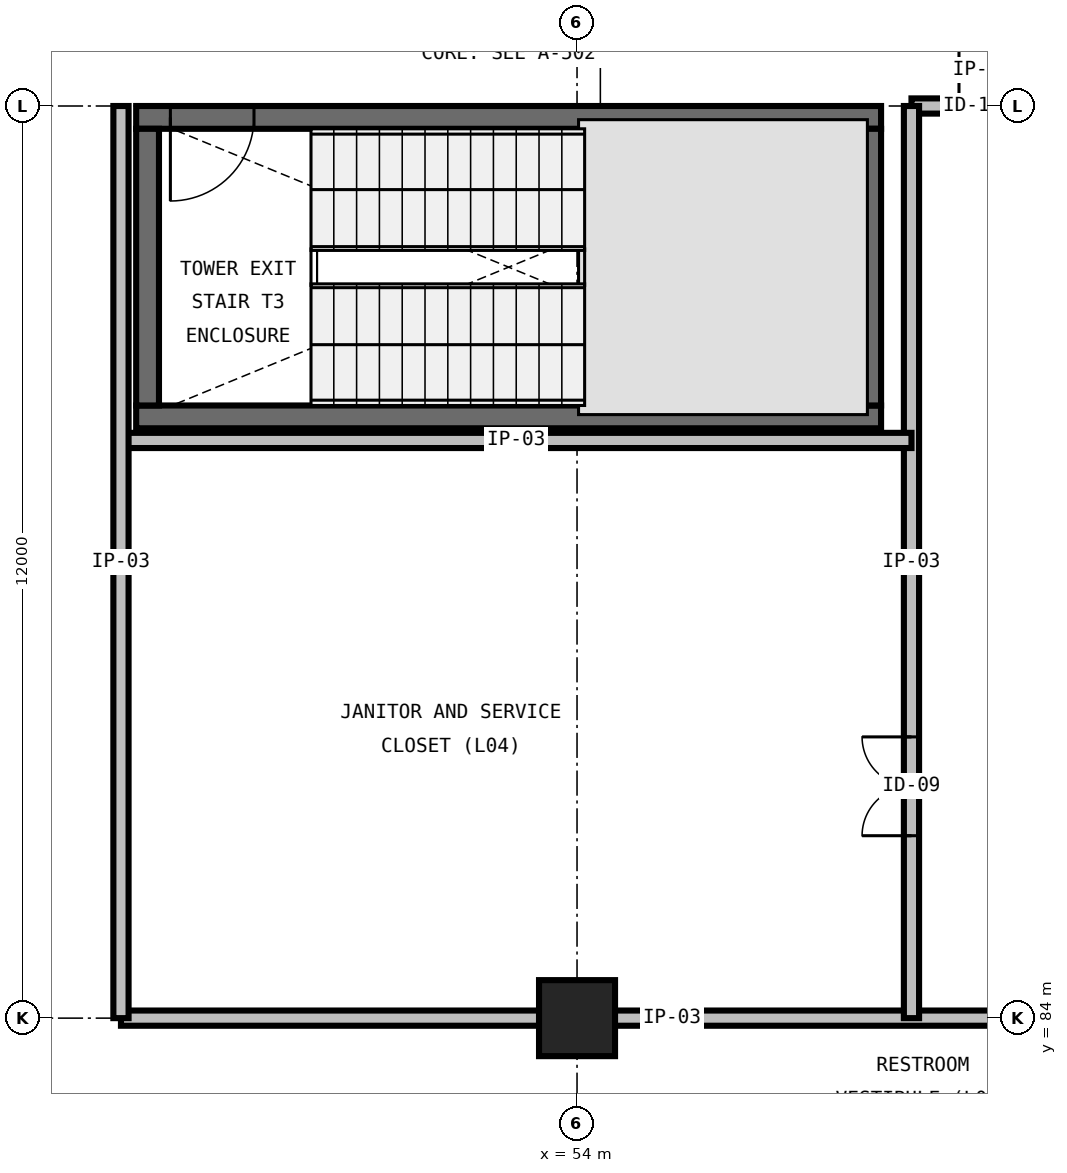
"""IFC4 building model, lengths in metres.
Left out: names, types, materials, properties, quantities, classifications, styles, units other than length and angle.
Written with IfcOpenShell. Run it as: python <this file> out.ifc"""

import sys

from ifc_helpers import new_model, si_unit, direction, frame, frame_2d, origin, origin_2d, place, context, subcontext, project, spatial, rectangle, extrude, element, fill, save


model = new_model("IFC4")
c1 = context("Model", 3, precision=1e-05, world=origin(), true_north=direction((0.0, 1.0)))
c2 = subcontext(c1, "Body", "Model", "MODEL_VIEW")
j1 = project(units=[si_unit("LENGTHUNIT", "METRE"), si_unit("PLANEANGLEUNIT", "RADIAN")], contexts=[c1])
p1 = place(None, origin())
s1 = spatial("IfcSite", under=j1, at=p1, CompositionType="ELEMENT")
p2 = place(p1, origin())
s2 = spatial("IfcBuilding", under=s1, at=p2, CompositionType="ELEMENT")
p3 = place(p2, frame((0.0, 0.0, 23.4)))
s3 = spatial("IfcBuildingStorey", under=s2, at=p3, CompositionType="ELEMENT", Elevation=23.4)
p4 = place(p3, frame((54.0, 84.0, 0.0), z_axis=(0.0, 0.0, 1.0), x_axis=(1.0, 0.0, 0.0)))
e1 = element("IfcColumn", 1, at=p4, inside=s3, PredefinedType="COLUMN", context=c2, shape_type="SweptSolid", body=[
    extrude(rectangle(XDim=1.0, YDim=1.0, at=origin_2d()), origin(), (0.0, 0.0, 1.0), 4.2),
])
p5 = place(p3, frame((48.2, 91.91, 0.0), z_axis=(0.0, 0.0, 1.0), x_axis=(1.0, 0.0, 0.0)))
e2 = element("IfcWall", 2, at=p5, inside=s3, PredefinedType="SHEAR", context=c2, shape_type="SweptSolid", body=[
    extrude(rectangle(XDim=9.8, YDim=0.3, at=frame_2d((4.9, 0.0))), origin(), (0.0, 0.0, 1.0), 4.2),
])
p6 = place(p3, frame((58.0, 95.85, 0.0), z_axis=(0.0, 0.0, 1.0), x_axis=(-1.0, 0.0, 0.0)))
e3 = element("IfcWall", 3, at=p6, inside=s3, PredefinedType="SHEAR", context=c2, shape_type="SweptSolid", body=[
    extrude(rectangle(XDim=9.8, YDim=0.3, at=frame_2d((4.9, 0.0))), origin(), (0.0, 0.0, 1.0), 4.2),
])
p7 = place(p6, frame((8.25, 0.0, 0.0)))
e4 = element("IfcOpeningElement", 4, at=p7, cuts=e3, PredefinedType="OPENING", context=c2, shape_type="SweptSolid", body=[
    extrude(rectangle(XDim=1.1, YDim=2.2, at=frame_2d((0.55, 1.1))), frame((0.0, 0.165, 0.0), z_axis=(0.0, -1.0, 0.0), x_axis=(1.0, 0.0, 0.0)), (0.0, 0.0, 1.0), 0.33),
])
for number, where, z_axis, x_axis in (
    (5, (48.35, 95.7, 0.0), (0.0, 0.0, 1.0), (0.0, -1.0, 0.0)),
    (6, (57.85, 92.06, 0.0), (0.0, 0.0, 1.0), (0.0, 1.0, 0.0)),
):
    element("IfcWall", number, at=place(p3, frame(where, z_axis=z_axis, x_axis=x_axis)), inside=s3, PredefinedType="SHEAR", context=c2, shape_type="SweptSolid", body=[
        extrude(rectangle(XDim=3.64, YDim=0.3, at=frame_2d((1.82, 0.0))), origin(), (0.0, 0.0, 1.0), 4.2),
    ])
p8 = place(p3, frame((48.0, 84.0, 0.0), z_axis=(0.0, 0.0, 1.0), x_axis=(1.0, 0.0, 0.0)))
e7 = element("IfcWall", 7, at=p8, inside=s3, PredefinedType="PARTITIONING", context=c2, shape_type="SweptSolid", body=[
    extrude(rectangle(XDim=18.0, YDim=0.2, at=frame_2d((9.0, 0.0))), origin(), (0.0, 0.0, 1.0), 2.752),
])
p9 = place(p3, frame((58.4, 96.0, 0.0), z_axis=(0.0, 0.0, 1.0), x_axis=(1.0, 0.0, 0.0)))
e8 = element("IfcWall", 8, at=p9, inside=s3, PredefinedType="PARTITIONING", context=c2, shape_type="SweptSolid", body=[
    extrude(rectangle(XDim=2.4, YDim=0.2, at=frame_2d((1.2, 0.0))), origin(), (0.0, 0.0, 1.0), 2.959),
])
p10 = place(p9, frame((0.625, 0.0, 0.0)))
e9 = element("IfcOpeningElement", 9, at=p10, cuts=e8, PredefinedType="OPENING", context=c2, shape_type="SweptSolid", body=[
    extrude(rectangle(XDim=0.95, YDim=2.15, at=frame_2d((0.475, 1.075))), frame((0.0, 0.115, 0.0), z_axis=(0.0, -1.0, 0.0), x_axis=(1.0, 0.0, 0.0)), (0.0, 0.0, 1.0), 0.23),
])
p11 = place(p3, frame((58.4, 84.0, 0.0), z_axis=(0.0, 0.0, 1.0), x_axis=(0.0, 1.0, 0.0)))
e10 = element("IfcWall", 10, at=p11, inside=s3, PredefinedType="PARTITIONING", context=c2, shape_type="SweptSolid", body=[
    extrude(rectangle(XDim=12.0, YDim=0.2, at=frame_2d((6.0, 0.0))), origin(), (0.0, 0.0, 1.0), 3.89),
])
p12 = place(p11, frame((2.4, 0.0, 0.0)))
e11 = element("IfcOpeningElement", 11, at=p12, cuts=e10, PredefinedType="OPENING", context=c2, shape_type="SweptSolid", body=[
    extrude(rectangle(XDim=1.3, YDim=2.2, at=frame_2d((0.65, 1.1))), frame((0.0, 0.115, 0.0), z_axis=(0.0, -1.0, 0.0), x_axis=(1.0, 0.0, 0.0)), (0.0, 0.0, 1.0), 0.23),
])
p13 = place(p3, frame((48.0, 91.6, 0.0), z_axis=(0.0, 0.0, 1.0), x_axis=(1.0, 0.0, 0.0)))
e12 = element("IfcWall", 12, at=p13, inside=s3, PredefinedType="PARTITIONING", context=c2, shape_type="SweptSolid", body=[
    extrude(rectangle(XDim=10.4, YDim=0.2, at=frame_2d((5.2, 0.0))), origin(), (0.0, 0.0, 1.0), 3.89),
])
p14 = place(p3, frame((48.0, 84.0, 0.0), z_axis=(0.0, 0.0, 1.0), x_axis=(0.0, 1.0, 0.0)))
e13 = element("IfcWall", 13, at=p14, inside=s3, PredefinedType="PARTITIONING", context=c2, shape_type="SweptSolid", body=[
    extrude(rectangle(XDim=12.0, YDim=0.2, at=frame_2d((6.0, 0.0))), origin(), (0.0, 0.0, 1.0), 3.89),
])
p15 = place(p7, origin())
e14 = element("IfcDoor", 14, at=p15, inside=s3, OperationType="SINGLE_SWING_RIGHT", PredefinedType="DOOR", context=c2, shape_type="SweptSolid", body=[
    extrude(rectangle(XDim=1.1, YDim=2.2, at=frame_2d((0.55, 1.1))), frame((0.0, 0.025, 0.0), z_axis=(0.0, -1.0, 0.0), x_axis=(1.0, 0.0, 0.0)), (0.0, 0.0, 1.0), 0.05),
])
fill(e4, e14)
p16 = place(p10, origin())
e15 = element("IfcDoor", 15, at=p16, inside=s3, OperationType="SINGLE_SWING_LEFT", PredefinedType="DOOR", context=c2, shape_type="SweptSolid", body=[
    extrude(rectangle(XDim=0.95, YDim=2.15, at=frame_2d((0.475, 1.075))), frame((0.0, 0.025, 0.0), z_axis=(0.0, -1.0, 0.0), x_axis=(1.0, 0.0, 0.0)), (0.0, 0.0, 1.0), 0.05),
])
fill(e9, e15)
p17 = place(p12, origin())
e16 = element("IfcDoor", 16, at=p17, inside=s3, OperationType="DOUBLE_DOOR_SINGLE_SWING", PredefinedType="DOOR", context=c2, shape_type="SweptSolid", body=[
    extrude(rectangle(XDim=1.3, YDim=2.2, at=frame_2d((0.65, 1.1))), frame((0.0, 0.025, 0.0), z_axis=(0.0, -1.0, 0.0), x_axis=(1.0, 0.0, 0.0)), (0.0, 0.0, 1.0), 0.05),
])
fill(e11, e16)
save(model, sys.argv[1])
